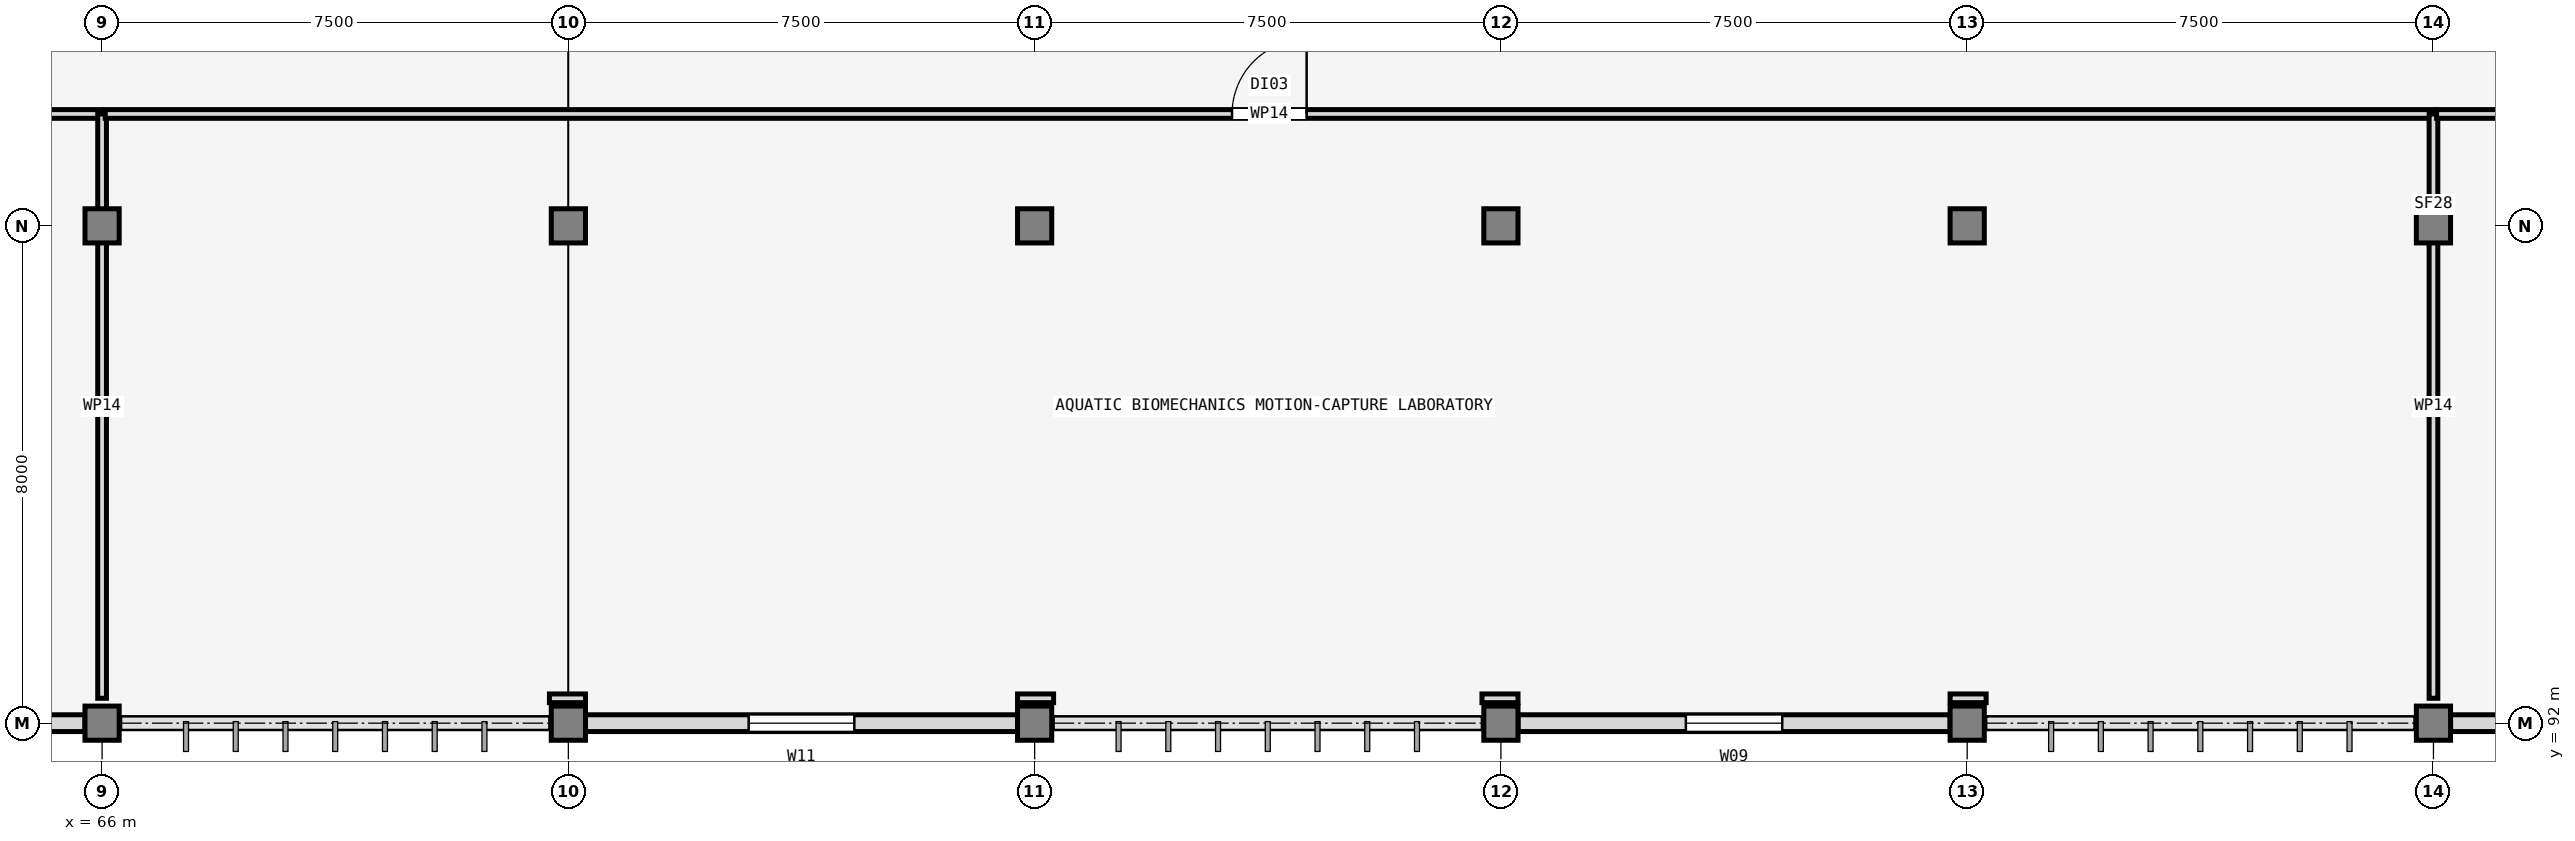
"""IFC4 building model, lengths in metres.
Left out: names, types, materials, properties, quantities, classifications, styles, units other than length and angle.
Written with IfcOpenShell. Run it as: python <this file> out.ifc"""

import sys

from ifc_helpers import new_model, si_unit, direction, frame, frame_2d, origin, origin_2d, place, context, subcontext, project, spatial, rectangle, extrude, element, fill, save


model = new_model("IFC4")
c1 = context("Model", 3, precision=1e-05, world=origin(), true_north=direction((0.0, 1.0)))
c2 = subcontext(c1, "Body", "Model", "MODEL_VIEW")
j1 = project(units=[si_unit("LENGTHUNIT", "METRE"), si_unit("PLANEANGLEUNIT", "RADIAN")], contexts=[c1])
p1 = place(None, origin())
s1 = spatial("IfcSite", under=j1, at=p1, CompositionType="ELEMENT")
p2 = place(p1, origin())
s2 = spatial("IfcBuilding", under=s1, at=p2, CompositionType="ELEMENT")
p3 = place(p2, frame((0.0, 0.0, 9.3)))
s3 = spatial("IfcBuildingStorey", under=s2, at=p3, CompositionType="ELEMENT", Elevation=9.3)
for number, where, z_axis, x_axis in (
    (1, (66.0, 92.0, 0.0), (0.0, 0.0, 1.0), (1.0, 0.0, 0.0)),
    (2, (66.0, 100.0, 0.0), (0.0, 0.0, 1.0), (1.0, 0.0, 0.0)),
    (3, (73.5, 92.0, 0.0), (0.0, 0.0, 1.0), (1.0, 0.0, 0.0)),
    (4, (73.5, 100.0, 0.0), (0.0, 0.0, 1.0), (1.0, 0.0, 0.0)),
    (5, (81.0, 92.0, 0.0), (0.0, 0.0, 1.0), (1.0, 0.0, 0.0)),
    (6, (81.0, 100.0, 0.0), (0.0, 0.0, 1.0), (1.0, 0.0, 0.0)),
    (7, (88.5, 92.0, 0.0), (0.0, 0.0, 1.0), (1.0, 0.0, 0.0)),
    (8, (88.5, 100.0, 0.0), (0.0, 0.0, 1.0), (1.0, 0.0, 0.0)),
    (9, (96.0, 92.0, 0.0), (0.0, 0.0, 1.0), (1.0, 0.0, 0.0)),
    (10, (96.0, 100.0, 0.0), (0.0, 0.0, 1.0), (1.0, 0.0, 0.0)),
    (11, (103.5, 92.0, 0.0), (0.0, 0.0, 1.0), (1.0, 0.0, 0.0)),
    (12, (103.5, 100.0, 0.0), (0.0, 0.0, 1.0), (1.0, 0.0, 0.0)),
):
    element("IfcColumn", number, at=place(p3, frame(where, z_axis=z_axis, x_axis=x_axis)), inside=s3, PredefinedType="COLUMN", context=c2, shape_type="SweptSolid", body=[
        extrude(rectangle(XDim=0.55, YDim=0.55, at=origin_2d()), origin(), (0.0, 0.0, 1.0), 4.2),
    ])
p4 = place(p3, frame((58.775, 92.0, 0.0), z_axis=(0.0, 0.0, 1.0), x_axis=(1.0, 0.0, 0.0)))
e13 = element("IfcWall", 13, at=p4, inside=s3, PredefinedType="SOLIDWALL", context=c2, shape_type="SweptSolid", body=[
    extrude(rectangle(XDim=6.95, YDim=0.27, at=frame_2d((3.475, 0.0))), origin(), (0.0, 0.0, 1.0), 3.42),
])
p5 = place(p4, frame((2.7, 0.0, 0.95)))
e14 = element("IfcOpeningElement", 14, at=p5, cuts=e13, PredefinedType="OPENING", context=c2, shape_type="SweptSolid", body=[
    extrude(rectangle(XDim=1.55, YDim=1.45, at=frame_2d((0.775, 0.725))), frame((0.0, 0.145, 0.0), z_axis=(0.0, -1.0, 0.0), x_axis=(1.0, 0.0, 0.0)), (0.0, 0.0, 1.0), 0.29),
])
p6 = place(p3, frame((73.775, 92.0, 0.0), z_axis=(0.0, 0.0, 1.0), x_axis=(1.0, 0.0, 0.0)))
e15 = element("IfcWall", 15, at=p6, inside=s3, PredefinedType="SOLIDWALL", context=c2, shape_type="SweptSolid", body=[
    extrude(rectangle(XDim=6.95, YDim=0.27, at=frame_2d((3.475, 0.0))), origin(), (0.0, 0.0, 1.0), 3.42),
])
p7 = place(p6, frame((2.625, 0.0, 0.95)))
e16 = element("IfcOpeningElement", 16, at=p7, cuts=e15, PredefinedType="OPENING", context=c2, shape_type="SweptSolid", body=[
    extrude(rectangle(XDim=1.7, YDim=1.55, at=frame_2d((0.85, 0.775))), frame((0.0, 0.145, 0.0), z_axis=(0.0, -1.0, 0.0), x_axis=(1.0, 0.0, 0.0)), (0.0, 0.0, 1.0), 0.29),
])
p8 = place(p3, frame((88.775, 92.0, 0.0), z_axis=(0.0, 0.0, 1.0), x_axis=(1.0, 0.0, 0.0)))
e17 = element("IfcWall", 17, at=p8, inside=s3, PredefinedType="SOLIDWALL", context=c2, shape_type="SweptSolid", body=[
    extrude(rectangle(XDim=6.95, YDim=0.27, at=frame_2d((3.475, 0.0))), origin(), (0.0, 0.0, 1.0), 3.42),
])
p9 = place(p8, frame((2.7, 0.0, 0.95)))
e18 = element("IfcOpeningElement", 18, at=p9, cuts=e17, PredefinedType="OPENING", context=c2, shape_type="SweptSolid", body=[
    extrude(rectangle(XDim=1.55, YDim=1.45, at=frame_2d((0.775, 0.725))), frame((0.0, 0.145, 0.0), z_axis=(0.0, -1.0, 0.0), x_axis=(1.0, 0.0, 0.0)), (0.0, 0.0, 1.0), 0.29),
])
p10 = place(p3, frame((103.775, 92.0, 0.0), z_axis=(0.0, 0.0, 1.0), x_axis=(1.0, 0.0, 0.0)))
e19 = element("IfcWall", 19, at=p10, inside=s3, PredefinedType="SOLIDWALL", context=c2, shape_type="SweptSolid", body=[
    extrude(rectangle(XDim=6.95, YDim=0.27, at=frame_2d((3.475, 0.0))), origin(), (0.0, 0.0, 1.0), 3.41),
])
p11 = place(p10, frame((2.625, 0.0, 0.95)))
e20 = element("IfcOpeningElement", 20, at=p11, cuts=e19, PredefinedType="OPENING", context=c2, shape_type="SweptSolid", body=[
    extrude(rectangle(XDim=1.7, YDim=1.55, at=frame_2d((0.85, 0.775))), frame((0.0, 0.145, 0.0), z_axis=(0.0, -1.0, 0.0), x_axis=(1.0, 0.0, 0.0)), (0.0, 0.0, 1.0), 0.29),
])
p12 = place(p3, frame((28.2, 101.8, 0.0), z_axis=(0.0, 0.0, 1.0), x_axis=(1.0, 0.0, 0.0)))
e21 = element("IfcWall", 21, at=p12, inside=s3, PredefinedType="PARTITIONING", context=c2, shape_type="SweptSolid", body=[
    extrude(rectangle(XDim=37.8, YDim=0.14, at=frame_2d((18.9, 0.0))), origin(), (0.0, 0.0, 1.0), 3.12),
])
p13 = place(p12, frame((18.3, 0.0, 0.0)))
e22 = element("IfcOpeningElement", 22, at=p13, cuts=e21, PredefinedType="OPENING", context=c2, shape_type="SweptSolid", body=[
    extrude(rectangle(XDim=1.2, YDim=2.15, at=frame_2d((0.6, 1.075))), frame((0.0, 0.08, 0.0), z_axis=(0.0, -1.0, 0.0), x_axis=(1.0, 0.0, 0.0)), (0.0, 0.0, 1.0), 0.16),
])
p14 = place(p3, frame((66.0, 101.8, 0.0), z_axis=(0.0, 0.0, 1.0), x_axis=(0.0, -1.0, 0.0)))
e23 = element("IfcWall", 23, at=p14, inside=s3, PredefinedType="PARTITIONING", context=c2, shape_type="SweptSolid", body=[
    extrude(rectangle(XDim=9.4, YDim=0.14, at=frame_2d((4.7, 0.0))), origin(), (0.0, 0.0, 1.0), 3.12),
])
p15 = place(p3, frame((66.05, 101.8, 0.0), z_axis=(0.0, 0.0, 1.0), x_axis=(1.0, 0.0, 0.0)))
e24 = element("IfcWall", 24, at=p15, inside=s3, PredefinedType="PARTITIONING", context=c2, shape_type="SweptSolid", body=[
    extrude(rectangle(XDim=37.45, YDim=0.14, at=frame_2d((18.725, 0.0))), origin(), (0.0, 0.0, 1.0), 3.12),
])
p16 = place(p15, frame((18.125, 0.0, 0.0)))
e25 = element("IfcOpeningElement", 25, at=p16, cuts=e24, PredefinedType="OPENING", context=c2, shape_type="SweptSolid", body=[
    extrude(rectangle(XDim=1.2, YDim=2.15, at=frame_2d((0.6, 1.075))), frame((0.0, 0.08, 0.0), z_axis=(0.0, -1.0, 0.0), x_axis=(1.0, 0.0, 0.0)), (0.0, 0.0, 1.0), 0.16),
])
p17 = place(p3, frame((103.5, 101.8, 0.0), z_axis=(0.0, 0.0, 1.0), x_axis=(0.0, -1.0, 0.0)))
e26 = element("IfcWall", 26, at=p17, inside=s3, PredefinedType="PARTITIONING", context=c2, shape_type="SweptSolid", body=[
    extrude(rectangle(XDim=9.4, YDim=0.14, at=frame_2d((4.7, 0.0))), origin(), (0.0, 0.0, 1.0), 3.12),
])
for number, where, z_axis, x_axis in (
    (27, (96.305, 92.4, 0.0), (0.0, 0.0, 1.0), (-1.0, 0.0, 0.0)),
    (28, (88.775, 92.4, 0.0), (0.0, 0.0, 1.0), (-1.0, 0.0, 0.0)),
    (29, (81.305, 92.4, 0.0), (0.0, 0.0, 1.0), (-1.0, 0.0, 0.0)),
    (30, (73.775, 92.4, 0.0), (0.0, 0.0, 1.0), (-1.0, 0.0, 0.0)),
):
    element("IfcWall", number, at=place(p3, frame(where, z_axis=z_axis, x_axis=x_axis)), inside=s3, PredefinedType="PARTITIONING", context=c2, shape_type="SweptSolid", body=[
        extrude(rectangle(XDim=0.58, YDim=0.14, at=frame_2d((0.29, 0.0))), origin(), (0.0, 0.0, 1.0), 3.12),
    ])
p18 = place(p3, frame((103.55, 101.8, 0.0), z_axis=(0.0, 0.0, 1.0), x_axis=(1.0, 0.0, 0.0)))
e31 = element("IfcWall", 31, at=p18, inside=s3, PredefinedType="PARTITIONING", context=c2, shape_type="SweptSolid", body=[
    extrude(rectangle(XDim=29.835, YDim=0.14, at=frame_2d((14.917, 0.0))), origin(), (0.0, 0.0, 1.0), 3.12),
])
p19 = place(p18, frame((4.417, 0.0, 0.0)))
e32 = element("IfcOpeningElement", 32, at=p19, cuts=e31, PredefinedType="OPENING", context=c2, shape_type="SweptSolid", body=[
    extrude(rectangle(XDim=1.2, YDim=2.15, at=frame_2d((0.6, 1.075))), frame((0.0, 0.08, 0.0), z_axis=(0.0, -1.0, 0.0), x_axis=(1.0, 0.0, 0.0)), (0.0, 0.0, 1.0), 0.16),
])
p20 = place(p7, origin())
e33 = element("IfcWindow", 33, at=p20, inside=s3, PartitioningType="SINGLE_PANEL", PredefinedType="WINDOW", context=c2, shape_type="SweptSolid", body=[
    extrude(rectangle(XDim=1.7, YDim=1.55, at=frame_2d((0.85, 0.775))), frame((0.0, 0.03, 0.0), z_axis=(0.0, -1.0, 0.0), x_axis=(1.0, 0.0, 0.0)), (0.0, 0.0, 1.0), 0.06),
])
fill(e16, e33)
p21 = place(p9, origin())
e34 = element("IfcWindow", 34, at=p21, inside=s3, PartitioningType="SINGLE_PANEL", PredefinedType="WINDOW", context=c2, shape_type="SweptSolid", body=[
    extrude(rectangle(XDim=1.55, YDim=1.45, at=frame_2d((0.775, 0.725))), frame((0.0, 0.03, 0.0), z_axis=(0.0, -1.0, 0.0), x_axis=(1.0, 0.0, 0.0)), (0.0, 0.0, 1.0), 0.06),
])
fill(e18, e34)
p22 = place(p16, origin())
e35 = element("IfcDoor", 35, at=p22, inside=s3, OperationType="SINGLE_SWING_RIGHT", PredefinedType="DOOR", context=c2, shape_type="SweptSolid", body=[
    extrude(rectangle(XDim=1.2, YDim=2.15, at=frame_2d((0.6, 1.075))), frame((0.0, 0.025, 0.0), z_axis=(0.0, -1.0, 0.0), x_axis=(1.0, 0.0, 0.0)), (0.0, 0.0, 1.0), 0.05),
])
fill(e25, e35)
save(model, sys.argv[1])
